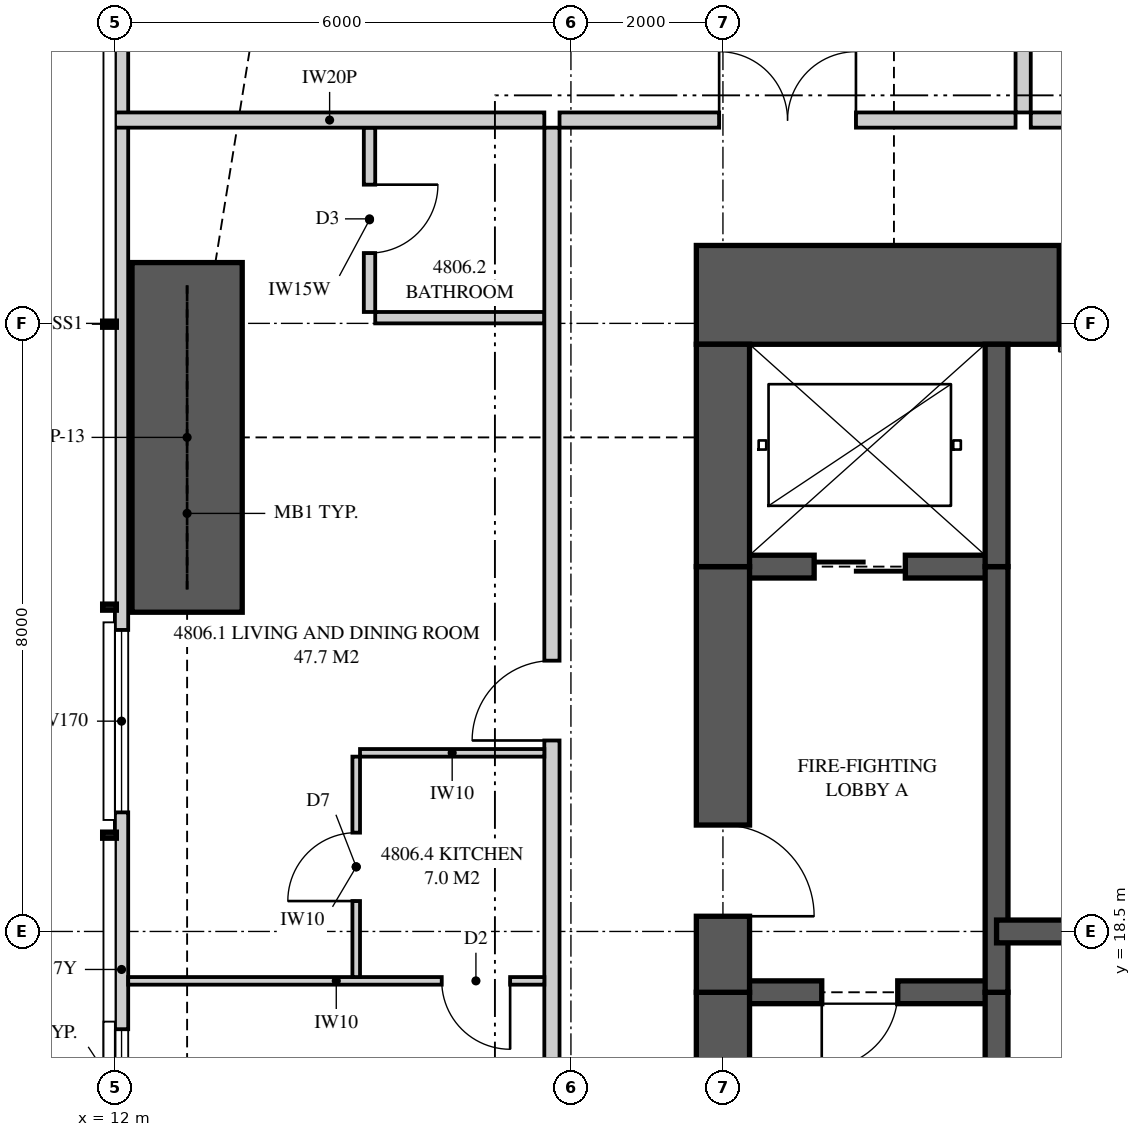
"""IFC4 building model, lengths in metres.
Left out: names, types, materials, properties, quantities, classifications, styles, units other than length and angle.
Written with IfcOpenShell. Run it as: python <this file> out.ifc"""

import sys

from ifc_helpers import new_model, si_unit, direction, frame, frame_2d, origin, place, context, subcontext, project, spatial, polyline, rectangle, outline, extrude, element, fill, save


model = new_model("IFC4")
c1 = context("Model", 3, precision=1e-05, world=origin(), true_north=direction((0.0, 1.0)))
c2 = subcontext(c1, "Body", "Model", "MODEL_VIEW")
j1 = project(units=[si_unit("LENGTHUNIT", "METRE"), si_unit("PLANEANGLEUNIT", "RADIAN")], contexts=[c1])
p1 = place(None, origin())
s1 = spatial("IfcSite", under=j1, at=p1, CompositionType="ELEMENT")
p2 = place(p1, origin())
s2 = spatial("IfcBuilding", under=s1, at=p2, CompositionType="ELEMENT")
p3 = place(p2, frame((0.0, 0.0, 177.8)))
s3 = spatial("IfcBuildingStorey", under=s2, at=p3, CompositionType="ELEMENT", Elevation=177.8)
p4 = place(p3, frame((26.0, 26.875, 0.0), z_axis=(0.0, 0.0, 1.0), x_axis=(-1.0, 0.0, 0.0)))
e1 = element("IfcWall", 1, at=p4, inside=s3, PredefinedType="SHEAR", context=c2, shape_type="SweptSolid", body=[
    extrude(rectangle(XDim=6.35, YDim=1.3, at=frame_2d((3.175, 0.0))), origin(), (0.0, 0.0, 1.0), 3.35),
])
p5 = place(p4, frame((0.825, 0.0, 0.0)))
e2 = element("IfcOpeningElement", 2, at=p5, cuts=e1, PredefinedType="OPENING", context=c2, shape_type="SweptSolid", body=[
    extrude(rectangle(XDim=0.75, YDim=2.1, at=frame_2d((0.375, 1.05))), frame((0.0, 0.66, 0.0), z_axis=(0.0, -1.0, 0.0), x_axis=(1.0, 0.0, 0.0)), (0.0, 0.0, 1.0), 1.32),
])
p6 = place(p3, frame((20.0, 26.225, 0.0), z_axis=(0.0, 0.0, 1.0), x_axis=(0.0, -1.0, 0.0)))
e3 = element("IfcWall", 3, at=p6, inside=s3, PredefinedType="SHEAR", context=c2, shape_type="SweptSolid", body=[
    extrude(rectangle(XDim=2.925, YDim=0.7, at=frame_2d((1.462, 0.0))), origin(), (0.0, 0.0, 1.0), 3.35),
])
p7 = place(p3, frame((20.0, 23.3, 0.0), z_axis=(0.0, 0.0, 1.0), x_axis=(0.0, -1.0, 0.0)))
e4 = element("IfcWall", 4, at=p7, inside=s3, PredefinedType="SHEAR", context=c2, shape_type="SweptSolid", body=[
    extrude(rectangle(XDim=5.6, YDim=0.7, at=frame_2d((2.8, 0.0))), origin(), (0.0, 0.0, 1.0), 3.35),
])
p8 = place(p7, frame((3.4, 0.0, 0.0)))
e5 = element("IfcOpeningElement", 5, at=p8, cuts=e4, PredefinedType="OPENING", context=c2, shape_type="SweptSolid", body=[
    extrude(rectangle(XDim=1.2, YDim=2.2, at=frame_2d((0.6, 1.1))), frame((0.0, 0.36, 0.0), z_axis=(0.0, -1.0, 0.0), x_axis=(1.0, 0.0, 0.0)), (0.0, 0.0, 1.0), 0.72),
])
p9 = place(p3, frame((20.0, 17.7, 0.0), z_axis=(0.0, 0.0, 1.0), x_axis=(0.0, -1.0, 0.0)))
e6 = element("IfcWall", 6, at=p9, inside=s3, PredefinedType="SHEAR", context=c2, shape_type="SweptSolid", body=[
    extrude(rectangle(XDim=4.7, YDim=0.7, at=frame_2d((2.35, 0.0))), origin(), (0.0, 0.0, 1.0), 3.35),
])
p10 = place(p3, frame((23.6, 10.775, 0.0), z_axis=(0.0, 0.0, 1.0), x_axis=(0.0, 1.0, 0.0)))
e7 = element("IfcWall", 7, at=p10, inside=s3, PredefinedType="SHEAR", context=c2, shape_type="SweptSolid", body=[
    extrude(rectangle(XDim=6.925, YDim=0.3, at=frame_2d((3.462, 0.0))), origin(), (0.0, 0.0, 1.0), 3.35),
])
p11 = place(p3, frame((23.6, 17.7, 0.0), z_axis=(0.0, 0.0, 1.0), x_axis=(0.0, 1.0, 0.0)))
e8 = element("IfcWall", 8, at=p11, inside=s3, PredefinedType="SHEAR", context=c2, shape_type="SweptSolid", body=[
    extrude(rectangle(XDim=5.6, YDim=0.3, at=frame_2d((2.8, 0.0))), origin(), (0.0, 0.0, 1.0), 3.35),
])
p12 = place(p3, frame((23.6, 23.3, 0.0), z_axis=(0.0, 0.0, 1.0), x_axis=(0.0, 1.0, 0.0)))
e9 = element("IfcWall", 9, at=p12, inside=s3, PredefinedType="SHEAR", context=c2, shape_type="SweptSolid", body=[
    extrude(rectangle(XDim=2.925, YDim=0.3, at=frame_2d((1.462, 0.0))), origin(), (0.0, 0.0, 1.0), 3.35),
])
p13 = place(p3, frame((20.0, 17.7, 0.0), z_axis=(0.0, 0.0, 1.0), x_axis=(1.0, 0.0, 0.0)))
e10 = element("IfcWall", 10, at=p13, inside=s3, PredefinedType="SHEAR", context=c2, shape_type="SweptSolid", body=[
    extrude(rectangle(XDim=3.6, YDim=0.3, at=frame_2d((1.8, 0.0))), origin(), (0.0, 0.0, 1.0), 3.35),
])
p14 = place(p13, frame((1.3, 0.0, 0.0)))
e11 = element("IfcOpeningElement", 11, at=p14, cuts=e10, PredefinedType="OPENING", context=c2, shape_type="SweptSolid", body=[
    extrude(rectangle(XDim=1.0, YDim=2.1, at=frame_2d((0.5, 1.05))), frame((0.0, 0.16, 0.0), z_axis=(0.0, -1.0, 0.0), x_axis=(1.0, 0.0, 0.0)), (0.0, 0.0, 1.0), 0.32),
])
p15 = place(p3, frame((20.0, 23.3, 0.0), z_axis=(0.0, 0.0, 1.0), x_axis=(1.0, 0.0, 0.0)))
e12 = element("IfcWall", 12, at=p15, inside=s3, PredefinedType="SHEAR", context=c2, shape_type="SweptSolid", body=[
    extrude(rectangle(XDim=3.6, YDim=0.3, at=frame_2d((1.8, 0.0))), origin(), (0.0, 0.0, 1.0), 3.35),
])
p16 = place(p15, frame((1.2, 0.0, 0.0)))
e13 = element("IfcOpeningElement", 13, at=p16, cuts=e12, PredefinedType="OPENING", context=c2, shape_type="SweptSolid", body=[
    extrude(rectangle(XDim=1.2, YDim=2.1, at=frame_2d((0.6, 1.05))), frame((0.0, 0.16, 0.0), z_axis=(0.0, -1.0, 0.0), x_axis=(1.0, 0.0, 0.0)), (0.0, 0.0, 1.0), 0.32),
])
p17 = place(p3, frame((23.6, 18.5, 0.0), z_axis=(0.0, 0.0, 1.0), x_axis=(1.0, 0.0, 0.0)))
e14 = element("IfcWall", 14, at=p17, inside=s3, PredefinedType="SHEAR", context=c2, shape_type="SweptSolid", body=[
    extrude(rectangle(XDim=2.4, YDim=0.3, at=frame_2d((1.2, 0.0))), origin(), (0.0, 0.0, 1.0), 3.35),
])
p18 = place(p3, frame((12.087, 32.949, 0.0), z_axis=(0.0, 0.0, 1.0), x_axis=(0.0, -1.0, 0.0)))
e15 = element("IfcWall", 15, at=p18, inside=s3, PredefinedType="SOLIDWALL", context=c2, shape_type="SweptSolid", body=[
    extrude(outline(polyline([(0.0, 0.0), (29.897, 0.0), (29.897, 3.11), (20.191, 3.11), (20.191, 2.15), (20.051, 2.15), (20.051, 3.11), (19.949, 3.11), (19.949, 2.15), (7.949, 2.15), (7.949, 3.11), (7.823, 3.11), (7.823, 2.15), (7.73, 2.15), (7.73, 3.11), (0.0, 3.11), (0.0, 0.0)])), frame((0.0, 0.087, 0.0), z_axis=(0.0, -1.0, 0.0), x_axis=(1.0, 0.0, 0.0)), (0.0, 0.0, 1.0), 0.175),
])
p19 = place(p18, frame((1.237, 0.0, 0.4)))
e16 = element("IfcOpeningElement", 16, at=p19, cuts=e15, PredefinedType="OPENING", context=c2, shape_type="SweptSolid", body=[
    extrude(rectangle(XDim=1.2, YDim=1.7, at=frame_2d((0.6, 0.85))), frame((0.0, 0.097, 0.0), z_axis=(0.0, -1.0, 0.0), x_axis=(1.0, 0.0, 0.0)), (0.0, 0.0, 1.0), 0.195),
])
p20 = place(p18, frame((10.482, 0.0, 0.4)))
e17 = element("IfcOpeningElement", 17, at=p20, cuts=e15, PredefinedType="OPENING", context=c2, shape_type="SweptSolid", body=[
    extrude(rectangle(XDim=2.4, YDim=1.7, at=frame_2d((1.2, 0.85))), frame((0.0, 0.097, 0.0), z_axis=(0.0, -1.0, 0.0), x_axis=(1.0, 0.0, 0.0)), (0.0, 0.0, 1.0), 0.195),
])
p21 = place(p18, frame((15.735, 0.0, 0.4)))
e18 = element("IfcOpeningElement", 18, at=p21, cuts=e15, PredefinedType="OPENING", context=c2, shape_type="SweptSolid", body=[
    extrude(rectangle(XDim=1.8, YDim=1.7, at=frame_2d((0.9, 0.85))), frame((0.0, 0.097, 0.0), z_axis=(0.0, -1.0, 0.0), x_axis=(1.0, 0.0, 0.0)), (0.0, 0.0, 1.0), 0.195),
])
p22 = place(p18, frame((22.624, 0.0, 0.0)))
e19 = element("IfcOpeningElement", 19, at=p22, cuts=e15, PredefinedType="OPENING", context=c2, shape_type="SweptSolid", body=[
    extrude(rectangle(XDim=1.8, YDim=2.1, at=frame_2d((0.9, 1.05))), frame((0.0, 0.097, 0.0), z_axis=(0.0, -1.0, 0.0), x_axis=(1.0, 0.0, 0.0)), (0.0, 0.0, 1.0), 0.195),
])
p23 = place(p18, frame((26.301, 0.0, 0.4)))
e20 = element("IfcOpeningElement", 20, at=p23, cuts=e15, PredefinedType="OPENING", context=c2, shape_type="SweptSolid", body=[
    extrude(rectangle(XDim=1.8, YDim=1.7, at=frame_2d((0.9, 0.85))), frame((0.0, 0.097, 0.0), z_axis=(0.0, -1.0, 0.0), x_axis=(1.0, 0.0, 0.0)), (0.0, 0.0, 1.0), 0.195),
])
p24 = place(p3, frame((23.95, 35.825, 0.0), z_axis=(0.0, 0.0, 1.0), x_axis=(0.0, -1.0, 0.0)))
e21 = element("IfcWall", 21, at=p24, inside=s3, PredefinedType="PARTITIONING", context=c2, shape_type="SweptSolid", body=[
    extrude(outline(polyline([(0.529, 2.15), (0.0, 2.15), (0.0, 0.0), (0.529, 0.0), (0.529, 0.123), (1.021, 0.123), (1.021, 0.0), (6.55, 0.0), (6.55, 3.11), (1.685, 3.11), (1.685, 2.15), (1.021, 2.15), (1.021, 2.027), (0.529, 2.027), (0.529, 2.15)])), frame((0.0, 0.1, 0.0), z_axis=(0.0, -1.0, 0.0), x_axis=(1.0, 0.0, 0.0)), (0.0, 0.0, 1.0), 0.2),
])
p25 = place(p3, frame((17.85, 29.175, 0.0), z_axis=(0.0, 0.0, 1.0), x_axis=(1.0, 0.0, 0.0)))
e22 = element("IfcWall", 22, at=p25, inside=s3, PredefinedType="PARTITIONING", context=c2, shape_type="SweptSolid", body=[
    extrude(outline(polyline([(0.0, 0.0), (6.0, 0.0), (6.0, 3.11), (4.737, 3.11), (4.737, 2.541), (4.062, 2.541), (4.062, 3.11), (0.0, 3.11), (0.0, 0.0)])), frame((0.0, 0.1, 0.0), z_axis=(0.0, -1.0, 0.0), x_axis=(1.0, 0.0, 0.0)), (0.0, 0.0, 1.0), 0.2),
])
p26 = place(p25, frame((2.1, 0.0, 0.0)))
e23 = element("IfcOpeningElement", 23, at=p26, cuts=e22, PredefinedType="OPENING", context=c2, shape_type="SweptSolid", body=[
    extrude(rectangle(XDim=1.8, YDim=2.1, at=frame_2d((0.9, 1.05))), frame((0.0, 0.11, 0.0), z_axis=(0.0, -1.0, 0.0), x_axis=(1.0, 0.0, 0.0)), (0.0, 0.0, 1.0), 0.22),
])
p27 = place(p3, frame((24.05, 29.175, 0.0), z_axis=(0.0, 0.0, 1.0), x_axis=(1.0, 0.0, 0.0)))
e24 = element("IfcWall", 24, at=p27, inside=s3, PredefinedType="PARTITIONING", context=c2, shape_type="SweptSolid", body=[
    extrude(outline(polyline([(0.0, 0.0), (21.9, 0.0), (21.9, 3.11), (19.037, 3.11), (19.037, 2.541), (18.363, 2.541), (18.363, 3.11), (8.787, 3.11), (8.787, 2.541), (8.113, 2.541), (8.113, 3.11), (0.0, 3.11), (0.0, 0.0)])), frame((0.0, 0.1, 0.0), z_axis=(0.0, -1.0, 0.0), x_axis=(1.0, 0.0, 0.0)), (0.0, 0.0, 1.0), 0.2),
])
p28 = place(p27, frame((13.925, 0.0, 0.0)))
e25 = element("IfcOpeningElement", 25, at=p28, cuts=e24, PredefinedType="OPENING", context=c2, shape_type="SweptSolid", body=[
    extrude(rectangle(XDim=1.05, YDim=2.2, at=frame_2d((0.525, 1.1))), frame((0.0, 0.11, 0.0), z_axis=(0.0, -1.0, 0.0), x_axis=(1.0, 0.0, 0.0)), (0.0, 0.0, 1.0), 0.22),
])
p29 = place(p3, frame((12.0, 29.175, 0.0), z_axis=(0.0, 0.0, 1.0), x_axis=(1.0, 0.0, 0.0)))
e26 = element("IfcWall", 26, at=p29, inside=s3, PredefinedType="PARTITIONING", context=c2, shape_type="SweptSolid", body=[
    extrude(outline(polyline([(0.0, 0.0), (5.65, 0.0), (5.65, 3.11), (2.547, 3.11), (2.547, 2.15), (0.703, 2.15), (0.703, 3.11), (0.0, 3.11), (0.0, 0.0)])), frame((0.0, 0.1, 0.0), z_axis=(0.0, -1.0, 0.0), x_axis=(1.0, 0.0, 0.0)), (0.0, 0.0, 1.0), 0.2),
])
p30 = place(p3, frame((17.75, 13.95, 0.0), z_axis=(0.0, 0.0, 1.0), x_axis=(0.0, 1.0, 0.0)))
e27 = element("IfcWall", 27, at=p30, inside=s3, PredefinedType="PARTITIONING", context=c2, shape_type="SweptSolid", body=[
    extrude(outline(polyline([(0.0, 0.0), (15.125, 0.0), (15.125, 3.11), (11.387, 3.11), (11.387, 2.541), (10.713, 2.541), (10.713, 3.11), (0.0, 3.11), (0.0, 0.0)])), frame((0.0, 0.1, 0.0), z_axis=(0.0, -1.0, 0.0), x_axis=(1.0, 0.0, 0.0)), (0.0, 0.0, 1.0), 0.2),
])
p31 = place(p30, frame((7.062, 0.0, 0.0)))
e28 = element("IfcOpeningElement", 28, at=p31, cuts=e27, PredefinedType="OPENING", context=c2, shape_type="SweptSolid", body=[
    extrude(rectangle(XDim=1.05, YDim=2.2, at=frame_2d((0.525, 1.1))), frame((0.0, 0.11, 0.0), z_axis=(0.0, -1.0, 0.0), x_axis=(1.0, 0.0, 0.0)), (0.0, 0.0, 1.0), 0.22),
])
p32 = place(p3, frame((15.35, 26.65, 0.0), z_axis=(0.0, 0.0, 1.0), x_axis=(0.0, 1.0, 0.0)))
e29 = element("IfcWall", 29, at=p32, inside=s3, PredefinedType="PLUMBINGWALL", context=c2, shape_type="SweptSolid", body=[
    extrude(rectangle(XDim=2.425, YDim=0.15, at=frame_2d((1.212, 0.0))), origin(), (0.0, 0.0, 1.0), 3.11),
])
p33 = place(p32, frame((0.775, 0.0, 0.0)))
e30 = element("IfcOpeningElement", 30, at=p33, cuts=e29, PredefinedType="OPENING", context=c2, shape_type="SweptSolid", body=[
    extrude(rectangle(XDim=0.9, YDim=2.1, at=frame_2d((0.45, 1.05))), frame((0.0, 0.085, 0.0), z_axis=(0.0, -1.0, 0.0), x_axis=(1.0, 0.0, 0.0)), (0.0, 0.0, 1.0), 0.17),
])
p34 = place(p3, frame((15.425, 26.575, 0.0), z_axis=(0.0, 0.0, 1.0), x_axis=(1.0, 0.0, 0.0)))
e31 = element("IfcWall", 31, at=p34, inside=s3, PredefinedType="PLUMBINGWALL", context=c2, shape_type="SweptSolid", body=[
    extrude(rectangle(XDim=2.225, YDim=0.15, at=frame_2d((1.112, 0.0))), origin(), (0.0, 0.0, 1.0), 3.11),
])
p35 = place(p3, frame((12.175, 17.85, 0.0), z_axis=(0.0, 0.0, 1.0), x_axis=(1.0, 0.0, 0.0)))
e32 = element("IfcWall", 32, at=p35, inside=s3, PredefinedType="PARTITIONING", context=c2, shape_type="SweptSolid", body=[
    extrude(outline(polyline([(0.0, 0.0), (5.475, 0.0), (5.475, 3.11), (1.635, 3.11), (1.635, 2.15), (0.0, 2.15), (0.0, 3.11), (0.0, 0.0)])), frame((0.0, 0.05, 0.0), z_axis=(0.0, -1.0, 0.0), x_axis=(1.0, 0.0, 0.0)), (0.0, 0.0, 1.0), 0.1),
])
p36 = place(p35, frame((4.125, 0.0, 0.0)))
e33 = element("IfcOpeningElement", 33, at=p36, cuts=e32, PredefinedType="OPENING", context=c2, shape_type="SweptSolid", body=[
    extrude(rectangle(XDim=0.9, YDim=2.1, at=frame_2d((0.45, 1.05))), frame((0.0, 0.06, 0.0), z_axis=(0.0, -1.0, 0.0), x_axis=(1.0, 0.0, 0.0)), (0.0, 0.0, 1.0), 0.12),
])
p37 = place(p3, frame((15.175, 17.9, 0.0), z_axis=(0.0, 0.0, 1.0), x_axis=(0.0, 1.0, 0.0)))
e34 = element("IfcWall", 34, at=p37, inside=s3, PredefinedType="PARTITIONING", context=c2, shape_type="SweptSolid", body=[
    extrude(rectangle(XDim=2.9, YDim=0.1, at=frame_2d((1.45, 0.0))), origin(), (0.0, 0.0, 1.0), 3.11),
])
p38 = place(p37, frame((1.0, 0.0, 0.0)))
e35 = element("IfcOpeningElement", 35, at=p38, cuts=e34, PredefinedType="OPENING", context=c2, shape_type="SweptSolid", body=[
    extrude(rectangle(XDim=0.9, YDim=2.1, at=frame_2d((0.45, 1.05))), frame((0.0, 0.06, 0.0), z_axis=(0.0, -1.0, 0.0), x_axis=(1.0, 0.0, 0.0)), (0.0, 0.0, 1.0), 0.12),
])
p39 = place(p3, frame((15.225, 20.85, 0.0), z_axis=(0.0, 0.0, 1.0), x_axis=(1.0, 0.0, 0.0)))
e36 = element("IfcWall", 36, at=p39, inside=s3, PredefinedType="PARTITIONING", context=c2, shape_type="SweptSolid", body=[
    extrude(rectangle(XDim=2.425, YDim=0.1, at=frame_2d((1.212, 0.0))), origin(), (0.0, 0.0, 1.0), 3.11),
])
p40 = place(p3, frame((12.95, 22.7, 0.0), z_axis=(0.0, 0.0, 1.0), x_axis=(0.0, 1.0, 0.0)))
e37 = element("IfcWall", 37, at=p40, inside=s3, PredefinedType="SHEAR", context=c2, shape_type="SweptSolid", body=[
    extrude(rectangle(XDim=4.6, YDim=1.45, at=frame_2d((2.3, 0.0))), origin(), (0.0, 0.0, 1.0), 3.35),
])
p41 = place(p20, origin())
e38 = element("IfcWindow", 38, at=p41, inside=s3, PartitioningType="SINGLE_PANEL", PredefinedType="WINDOW", context=c2, shape_type="SweptSolid", body=[
    extrude(rectangle(XDim=2.4, YDim=1.7, at=frame_2d((1.2, 0.85))), frame((0.0, 0.03, 0.0), z_axis=(0.0, -1.0, 0.0), x_axis=(1.0, 0.0, 0.0)), (0.0, 0.0, 1.0), 0.06),
])
fill(e17, e38)
p42 = place(p21, origin())
e39 = element("IfcWindow", 39, at=p42, inside=s3, PartitioningType="SINGLE_PANEL", PredefinedType="WINDOW", context=c2, shape_type="SweptSolid", body=[
    extrude(rectangle(XDim=1.8, YDim=1.7, at=frame_2d((0.9, 0.85))), frame((0.0, 0.03, 0.0), z_axis=(0.0, -1.0, 0.0), x_axis=(1.0, 0.0, 0.0)), (0.0, 0.0, 1.0), 0.06),
])
fill(e18, e39)
p43 = place(p26, origin())
e40 = element("IfcDoor", 40, at=p43, inside=s3, OperationType="DOUBLE_DOOR_SINGLE_SWING", PredefinedType="DOOR", context=c2, shape_type="SweptSolid", body=[
    extrude(rectangle(XDim=1.8, YDim=2.1, at=frame_2d((0.9, 1.05))), frame((0.0, 0.025, 0.0), z_axis=(0.0, -1.0, 0.0), x_axis=(1.0, 0.0, 0.0)), (0.0, 0.0, 1.0), 0.05),
])
fill(e23, e40)
p44 = place(p31, origin())
e41 = element("IfcDoor", 41, at=p44, inside=s3, OperationType="SINGLE_SWING_LEFT", PredefinedType="DOOR", context=c2, shape_type="SweptSolid", body=[
    extrude(rectangle(XDim=1.05, YDim=2.2, at=frame_2d((0.525, 1.1))), frame((0.0, 0.025, 0.0), z_axis=(0.0, -1.0, 0.0), x_axis=(1.0, 0.0, 0.0)), (0.0, 0.0, 1.0), 0.05),
])
fill(e28, e41)
p45 = place(p33, frame((0.9, 0.0, 0.0), z_axis=(0.0, 0.0, 1.0), x_axis=(-1.0, 0.0, 0.0)))
e42 = element("IfcDoor", 42, at=p45, inside=s3, OperationType="SINGLE_SWING_LEFT", PredefinedType="DOOR", context=c2, shape_type="SweptSolid", body=[
    extrude(rectangle(XDim=0.9, YDim=2.1, at=frame_2d((0.45, 1.05))), frame((0.0, 0.025, 0.0), z_axis=(0.0, -1.0, 0.0), x_axis=(1.0, 0.0, 0.0)), (0.0, 0.0, 1.0), 0.05),
])
fill(e30, e42)
p46 = place(p36, frame((0.9, 0.0, 0.0), z_axis=(0.0, 0.0, 1.0), x_axis=(-1.0, 0.0, 0.0)))
e43 = element("IfcDoor", 43, at=p46, inside=s3, OperationType="SINGLE_SWING_LEFT", PredefinedType="DOOR", context=c2, shape_type="SweptSolid", body=[
    extrude(rectangle(XDim=0.9, YDim=2.1, at=frame_2d((0.45, 1.05))), frame((0.0, 0.025, 0.0), z_axis=(0.0, -1.0, 0.0), x_axis=(1.0, 0.0, 0.0)), (0.0, 0.0, 1.0), 0.05),
])
fill(e33, e43)
p47 = place(p38, origin())
e44 = element("IfcDoor", 44, at=p47, inside=s3, OperationType="SINGLE_SWING_LEFT", PredefinedType="DOOR", context=c2, shape_type="SweptSolid", body=[
    extrude(rectangle(XDim=0.9, YDim=2.1, at=frame_2d((0.45, 1.05))), frame((0.0, 0.025, 0.0), z_axis=(0.0, -1.0, 0.0), x_axis=(1.0, 0.0, 0.0)), (0.0, 0.0, 1.0), 0.05),
])
fill(e35, e44)
p48 = place(p14, frame((1.0, 0.0, 0.0), z_axis=(0.0, 0.0, 1.0), x_axis=(-1.0, 0.0, 0.0)))
e45 = element("IfcDoor", 45, at=p48, inside=s3, OperationType="SINGLE_SWING_RIGHT", PredefinedType="DOOR", context=c2, shape_type="SweptSolid", body=[
    extrude(rectangle(XDim=1.0, YDim=2.1, at=frame_2d((0.5, 1.05))), frame((0.0, 0.025, 0.0), z_axis=(0.0, -1.0, 0.0), x_axis=(1.0, 0.0, 0.0)), (0.0, 0.0, 1.0), 0.05),
])
fill(e11, e45)
p49 = place(p8, origin())
e46 = element("IfcDoor", 46, at=p49, inside=s3, OperationType="SINGLE_SWING_RIGHT", PredefinedType="DOOR", context=c2, shape_type="SweptSolid", body=[
    extrude(rectangle(XDim=1.2, YDim=2.2, at=frame_2d((0.6, 1.1))), frame((0.0, 0.025, 0.0), z_axis=(0.0, -1.0, 0.0), x_axis=(1.0, 0.0, 0.0)), (0.0, 0.0, 1.0), 0.05),
])
fill(e5, e46)
p50 = place(p16, origin())
e47 = element("IfcDoor", 47, at=p50, inside=s3, OperationType="SLIDING_TO_LEFT", PredefinedType="DOOR", context=c2, shape_type="SweptSolid", body=[
    extrude(rectangle(XDim=1.2, YDim=2.1, at=frame_2d((0.6, 1.05))), frame((0.0, 0.025, 0.0), z_axis=(0.0, -1.0, 0.0), x_axis=(1.0, 0.0, 0.0)), (0.0, 0.0, 1.0), 0.05),
])
fill(e13, e47)
p51 = place(p5, origin())
e48 = element("IfcDoor", 48, at=p51, inside=s3, OperationType="SINGLE_SWING_RIGHT", PredefinedType="DOOR", context=c2, shape_type="SweptSolid", body=[
    extrude(rectangle(XDim=0.75, YDim=2.1, at=frame_2d((0.375, 1.05))), frame((0.0, 0.025, 0.0), z_axis=(0.0, -1.0, 0.0), x_axis=(1.0, 0.0, 0.0)), (0.0, 0.0, 1.0), 0.05),
])
fill(e2, e48)
save(model, sys.argv[1])
